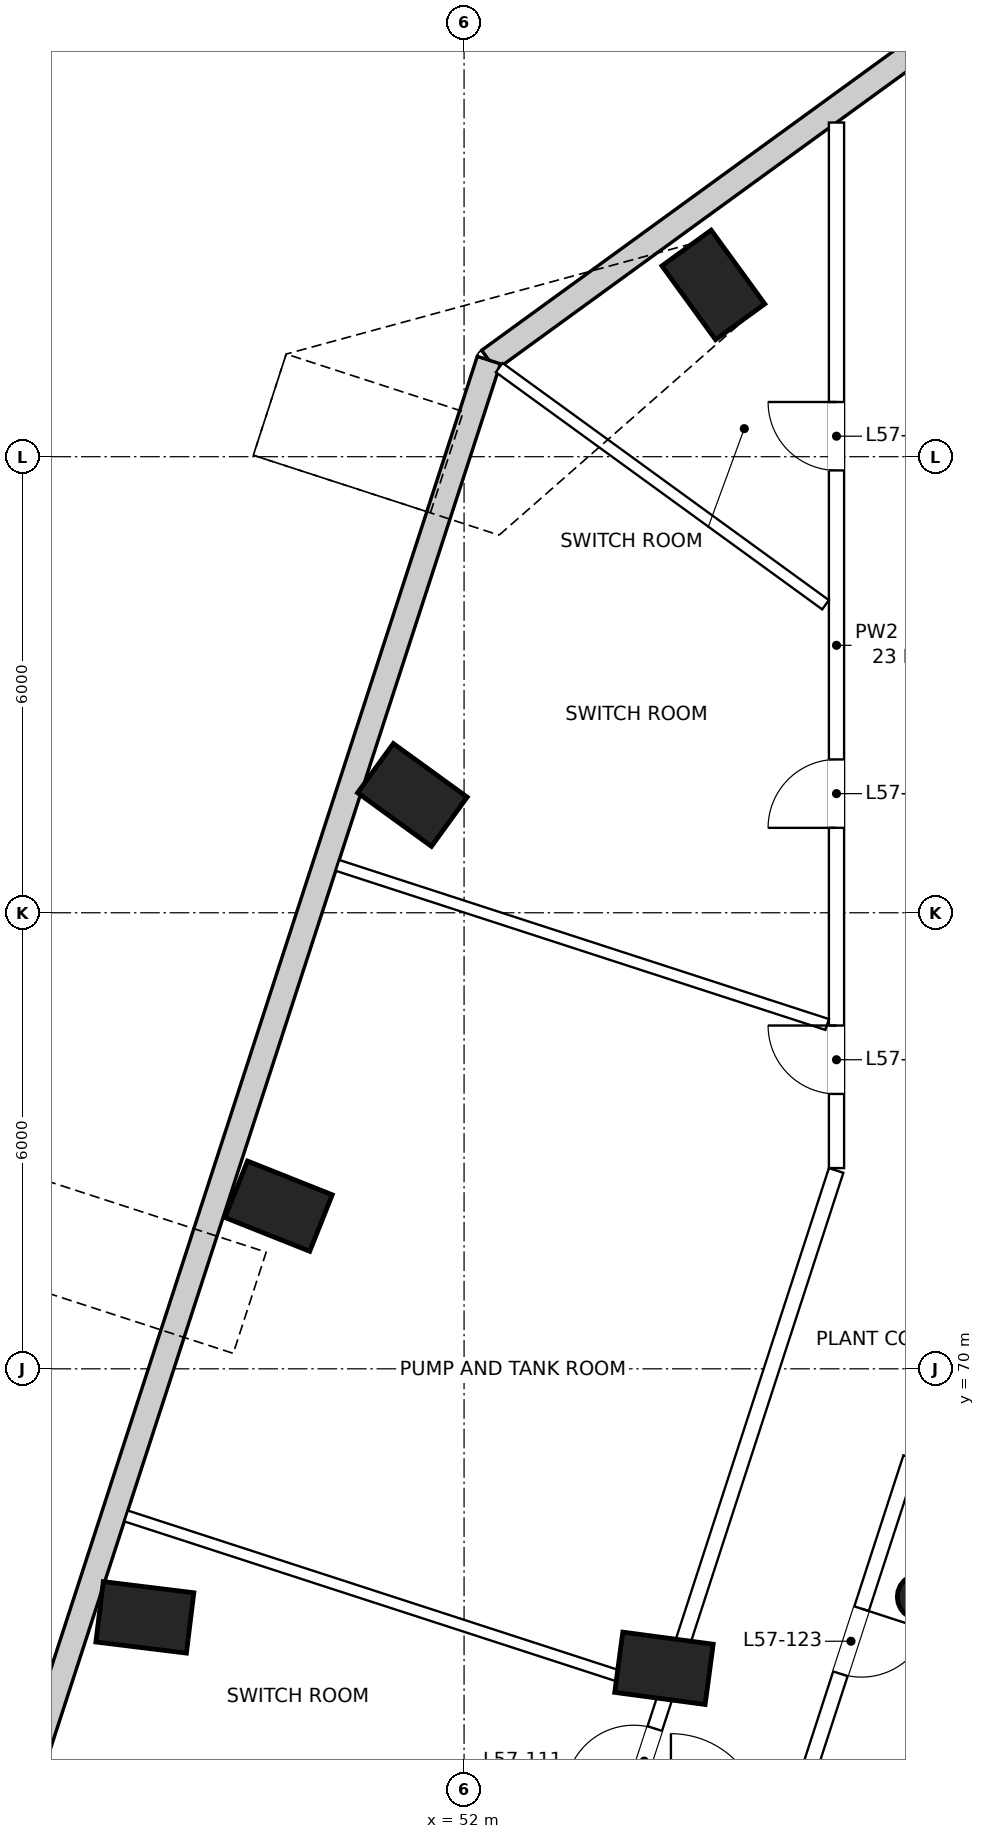
"""IFC4 building model, lengths in metres.
Left out: names, types, materials, properties, quantities, classifications, styles, units other than length and angle.
Written with IfcOpenShell. Run it as: python <this file> out.ifc"""

import sys

from ifc_helpers import new_model, si_unit, direction, frame, frame_2d, origin, origin_2d, place, context, subcontext, project, spatial, rectangle, circle, extrude, element, fill, save


model = new_model("IFC4")
c1 = context("Model", 3, precision=1e-05, world=origin(), true_north=direction((0.0, 1.0)))
c2 = subcontext(c1, "Body", "Model", "MODEL_VIEW")
j1 = project(units=[si_unit("LENGTHUNIT", "METRE"), si_unit("PLANEANGLEUNIT", "RADIAN")], contexts=[c1])
p1 = place(None, origin())
s1 = spatial("IfcSite", under=j1, at=p1, CompositionType="ELEMENT")
p2 = place(p1, origin())
s2 = spatial("IfcBuilding", under=s1, at=p2, CompositionType="ELEMENT")
p3 = place(p2, frame((0.0, 0.0, 243.3)))
s3 = spatial("IfcBuildingStorey", under=s2, at=p3, CompositionType="ELEMENT", Elevation=243.3)
for number, where, z_axis, x_axis in (
    (1, (55.28, 84.26, 0.0), (0.0, 0.0, 1.0), (0.809, 0.588, 0.0)),
    (2, (51.32, 77.55, 0.0), (0.0, 0.0, 1.0), (0.587, 0.81, 0.0)),
    (3, (49.56, 72.14, 0.0), (0.0, 0.0, 1.0), (0.37, 0.929, 0.0)),
    (4, (47.8, 66.73, 0.0), (0.0, 0.0, 1.0), (0.122, 0.993, 0.0)),
    (5, (54.63, 66.06, 0.0), (0.0, 0.0, 1.0), (0.133, 0.991, 0.0)),
):
    element("IfcColumn", number, at=place(p3, frame(where, z_axis=z_axis, x_axis=x_axis)), inside=s3, PredefinedType="COLUMN", context=c2, shape_type="SweptSolid", body=[
        extrude(rectangle(XDim=0.8, YDim=1.2, at=origin_2d()), origin(), (0.0, 0.0, 1.0), 5.0),
    ])
p4 = place(p3, frame((58.0, 67.0, 0.0), z_axis=(0.0, 0.0, 1.0), x_axis=(1.0, 0.0, 0.0)))
e6 = element("IfcColumn", 6, at=p4, inside=s3, PredefinedType="COLUMN", context=c2, shape_type="SweptSolid", body=[
    extrude(circle(Radius=0.3, at=origin_2d()), origin(), (0.0, 0.0, 1.0), 5.0),
])
p5 = place(p3, frame((58.615, 87.84, 0.0), z_axis=(0.0, 0.0, 1.0), x_axis=(-0.809023894763, -0.587775754605, 0.0)))
e7 = element("IfcWall", 7, at=p5, inside=s3, PredefinedType="SOLIDWALL", context=c2, shape_type="SweptSolid", body=[
    extrude(rectangle(XDim=7.774, YDim=0.32, at=frame_2d((3.887, 0.0))), origin(), (0.0, 0.0, 1.0), 4.7),
])
p6 = place(p3, frame((52.326, 83.271, 0.0), z_axis=(0.0, 0.0, 1.0), x_axis=(-0.309006630814, -0.951059883558, 0.0)))
e8 = element("IfcWall", 8, at=p6, inside=s3, PredefinedType="SOLIDWALL", context=c2, shape_type="SweptSolid", body=[
    extrude(rectangle(XDim=19.875, YDim=0.32, at=frame_2d((9.937, 0.0))), origin(), (0.0, 0.0, 1.0), 4.7),
])
p7 = place(p3, frame((54.049, 63.85, 0.0), z_axis=(0.0, 0.0, 1.0), x_axis=(0.309006358617, 0.951059971997, 0.0)))
e9 = element("IfcWall", 9, at=p7, inside=s3, PredefinedType="PARTITIONING", context=c2, shape_type="SweptSolid", body=[
    extrude(rectangle(XDim=9.211, YDim=0.2, at=frame_2d((4.605, 0.0))), origin(), (0.0, 0.0, 1.0), 3.7),
])
p8 = place(p7, frame((0.59, 0.0, 0.0)))
e10 = element("IfcOpeningElement", 10, at=p8, cuts=e9, PredefinedType="OPENING", context=c2, shape_type="SweptSolid", body=[
    extrude(rectangle(XDim=0.9, YDim=2.1, at=frame_2d((0.45, 1.05))), frame((0.0, 0.11, 0.0), z_axis=(0.0, -1.0, 0.0), x_axis=(1.0, 0.0, 0.0)), (0.0, 0.0, 1.0), 0.22),
])
p9 = place(p3, frame((56.9, 72.641, 0.0), z_axis=(0.0, 0.0, 1.0), x_axis=(0.0, 1.0, 0.0)))
e11 = element("IfcWall", 11, at=p9, inside=s3, PredefinedType="PARTITIONING", context=c2, shape_type="SweptSolid", body=[
    extrude(rectangle(XDim=13.755, YDim=0.2, at=frame_2d((6.878, 0.0))), origin(), (0.0, 0.0, 1.0), 4.25),
])
p10 = place(p9, frame((0.976, 0.0, 0.0)))
e12 = element("IfcOpeningElement", 12, at=p10, cuts=e11, PredefinedType="OPENING", context=c2, shape_type="SweptSolid", body=[
    extrude(rectangle(XDim=0.9, YDim=2.1, at=frame_2d((0.45, 1.05))), frame((0.0, 0.11, 0.0), z_axis=(0.0, -1.0, 0.0), x_axis=(1.0, 0.0, 0.0)), (0.0, 0.0, 1.0), 0.22),
])
p11 = place(p9, frame((4.476, 0.0, 0.0)))
e13 = element("IfcOpeningElement", 13, at=p11, cuts=e11, PredefinedType="OPENING", context=c2, shape_type="SweptSolid", body=[
    extrude(rectangle(XDim=0.9, YDim=2.1, at=frame_2d((0.45, 1.05))), frame((0.0, 0.11, 0.0), z_axis=(0.0, -1.0, 0.0), x_axis=(1.0, 0.0, 0.0)), (0.0, 0.0, 1.0), 0.22),
])
p12 = place(p9, frame((9.179, 0.0, 0.0)))
e14 = element("IfcOpeningElement", 14, at=p12, cuts=e11, PredefinedType="OPENING", context=c2, shape_type="SweptSolid", body=[
    extrude(rectangle(XDim=0.9, YDim=2.1, at=frame_2d((0.45, 1.05))), frame((0.0, 0.11, 0.0), z_axis=(0.0, -1.0, 0.0), x_axis=(1.0, 0.0, 0.0)), (0.0, 0.0, 1.0), 0.22),
])
p13 = place(p3, frame((57.875, 68.831, 0.0), z_axis=(0.0, 0.0, 1.0), x_axis=(-0.309030204086, -0.951052224099, 0.0)))
e15 = element("IfcWall", 15, at=p13, inside=s3, PredefinedType="PARTITIONING", context=c2, shape_type="SweptSolid", body=[
    extrude(rectangle(XDim=5.237, YDim=0.2, at=frame_2d((2.619, 0.0))), origin(), (0.0, 0.0, 1.0), 4.7),
])
p14 = place(p13, frame((2.089, 0.0, 0.0)))
e16 = element("IfcOpeningElement", 16, at=p14, cuts=e15, PredefinedType="OPENING", context=c2, shape_type="SweptSolid", body=[
    extrude(rectangle(XDim=0.9, YDim=2.1, at=frame_2d((0.45, 1.05))), frame((0.0, 0.11, 0.0), z_axis=(0.0, -1.0, 0.0), x_axis=(1.0, 0.0, 0.0)), (0.0, 0.0, 1.0), 0.22),
])
p15 = place(p3, frame((52.462, 83.172, 0.0), z_axis=(0.0, 0.0, 1.0), x_axis=(0.80900452613, -0.587802412976, 0.0)))
e17 = element("IfcWall", 17, at=p15, inside=s3, PredefinedType="PARTITIONING", context=c2, shape_type="SweptSolid", body=[
    extrude(rectangle(XDim=5.308, YDim=0.15, at=frame_2d((2.654, 0.0))), origin(), (0.0, 0.0, 1.0), 4.25),
])
p16 = place(p3, frame((50.334, 76.624, 0.0), z_axis=(0.0, 0.0, 1.0), x_axis=(0.95105975592, -0.309007023656, 0.0)))
e18 = element("IfcWall", 18, at=p16, inside=s3, PredefinedType="PARTITIONING", context=c2, shape_type="SweptSolid", body=[
    extrude(rectangle(XDim=6.774, YDim=0.15, at=frame_2d((3.387, 0.0))), origin(), (0.0, 0.0, 1.0), 3.7),
])
p17 = place(p3, frame((47.553, 68.064, 0.0), z_axis=(0.0, 0.0, 1.0), x_axis=(0.951060806233, -0.309003790992, 0.0)))
e19 = element("IfcWall", 19, at=p17, inside=s3, PredefinedType="PARTITIONING", context=c2, shape_type="SweptSolid", body=[
    extrude(rectangle(XDim=7.38, YDim=0.15, at=frame_2d((3.69, 0.0))), origin(), (0.0, 0.0, 1.0), 4.7),
])
p18 = place(p8, origin())
e20 = element("IfcDoor", 20, at=p18, inside=s3, OperationType="SINGLE_SWING_LEFT", PredefinedType="DOOR", context=c2, shape_type="SweptSolid", body=[
    extrude(rectangle(XDim=0.9, YDim=2.1, at=frame_2d((0.45, 1.05))), frame((0.0, 0.025, 0.0), z_axis=(0.0, -1.0, 0.0), x_axis=(1.0, 0.0, 0.0)), (0.0, 0.0, 1.0), 0.05),
])
fill(e10, e20)
p19 = place(p10, origin())
e21 = element("IfcDoor", 21, at=p19, inside=s3, OperationType="SINGLE_SWING_RIGHT", PredefinedType="DOOR", context=c2, shape_type="SweptSolid", body=[
    extrude(rectangle(XDim=0.9, YDim=2.1, at=frame_2d((0.45, 1.05))), frame((0.0, 0.025, 0.0), z_axis=(0.0, -1.0, 0.0), x_axis=(1.0, 0.0, 0.0)), (0.0, 0.0, 1.0), 0.05),
])
fill(e12, e21)
p20 = place(p11, origin())
e22 = element("IfcDoor", 22, at=p20, inside=s3, OperationType="SINGLE_SWING_LEFT", PredefinedType="DOOR", context=c2, shape_type="SweptSolid", body=[
    extrude(rectangle(XDim=0.9, YDim=2.1, at=frame_2d((0.45, 1.05))), frame((0.0, 0.025, 0.0), z_axis=(0.0, -1.0, 0.0), x_axis=(1.0, 0.0, 0.0)), (0.0, 0.0, 1.0), 0.05),
])
fill(e13, e22)
p21 = place(p12, origin())
e23 = element("IfcDoor", 23, at=p21, inside=s3, OperationType="SINGLE_SWING_RIGHT", PredefinedType="DOOR", context=c2, shape_type="SweptSolid", body=[
    extrude(rectangle(XDim=0.9, YDim=2.1, at=frame_2d((0.45, 1.05))), frame((0.0, 0.025, 0.0), z_axis=(0.0, -1.0, 0.0), x_axis=(1.0, 0.0, 0.0)), (0.0, 0.0, 1.0), 0.05),
])
fill(e14, e23)
p22 = place(p14, origin())
e24 = element("IfcDoor", 24, at=p22, inside=s3, OperationType="SINGLE_SWING_LEFT", PredefinedType="DOOR", context=c2, shape_type="SweptSolid", body=[
    extrude(rectangle(XDim=0.9, YDim=2.1, at=frame_2d((0.45, 1.05))), frame((0.0, 0.025, 0.0), z_axis=(0.0, -1.0, 0.0), x_axis=(1.0, 0.0, 0.0)), (0.0, 0.0, 1.0), 0.05),
])
fill(e16, e24)
save(model, sys.argv[1])
